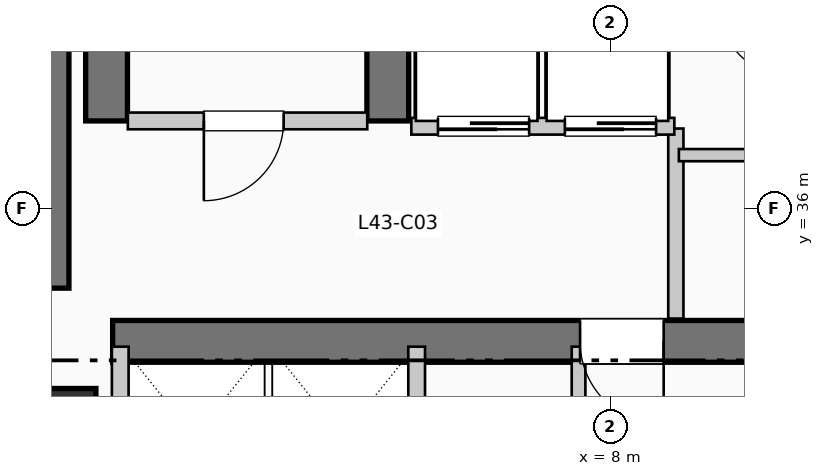
"""IFC4 building model, lengths in metres.
Left out: names, types, materials, properties, quantities, classifications, styles, units other than length and angle.
Written with IfcOpenShell. Run it as: python <this file> out.ifc"""

import sys

from ifc_helpers import new_model, si_unit, direction, frame, frame_2d, origin, origin_2d, place, context, subcontext, project, spatial, rectangle, extrude, element, fill, save


model = new_model("IFC4")
c1 = context("Model", 3, precision=1e-05, world=origin(), true_north=direction((0.0, 1.0)))
c2 = subcontext(c1, "Body", "Model", "MODEL_VIEW")
j1 = project(units=[si_unit("LENGTHUNIT", "METRE"), si_unit("PLANEANGLEUNIT", "RADIAN")], contexts=[c1])
p1 = place(None, origin())
s1 = spatial("IfcSite", under=j1, at=p1, CompositionType="ELEMENT")
p2 = place(p1, origin())
s2 = spatial("IfcBuilding", under=s1, at=p2, CompositionType="ELEMENT")
p3 = place(p2, frame((0.0, 0.0, 179.52)))
s3 = spatial("IfcBuildingStorey", under=s2, at=p3, CompositionType="ELEMENT", Elevation=179.52)
p4 = place(p3, frame((0.5, 34.95, 0.0), z_axis=(0.0, 0.0, 1.0), x_axis=(0.0, 1.0, 0.0)))
e1 = element("IfcWall", 1, at=p4, inside=s3, PredefinedType="SHEAR", context=c2, shape_type="SweptSolid", body=[
    extrude(rectangle(XDim=7.9, YDim=0.75, at=frame_2d((3.95, 0.0))), origin(), (0.0, 0.0, 1.0), 3.96),
])
p5 = place(p3, frame((1.45, 34.25, 0.0), z_axis=(0.0, 0.0, 1.0), x_axis=(1.0, 0.0, 0.0)))
e2 = element("IfcWall", 2, at=p5, inside=s3, PredefinedType="SHEAR", context=c2, shape_type="SweptSolid", body=[
    extrude(rectangle(XDim=10.71, YDim=0.55, at=frame_2d((5.355, 0.0))), origin(), (0.0, 0.0, 1.0), 3.96),
])
p6 = place(p5, frame((7.25, 0.0, 0.0), z_axis=(0.0, 0.0, 1.0), x_axis=(-1.0, 0.0, 0.0)))
e3 = element("IfcOpeningElement", 3, at=p6, cuts=e2, PredefinedType="OPENING", context=c2, shape_type="SweptSolid", body=[
    extrude(rectangle(XDim=1.1, YDim=2.15, at=frame_2d((0.55, 1.075))), frame((0.0, 0.285, 0.0), z_axis=(0.0, -1.0, 0.0), x_axis=(1.0, 0.0, 0.0)), (0.0, 0.0, 1.0), 0.57),
])
for number, where, z_axis, x_axis in (
    (4, (1.37, 37.15, 0.0), (0.0, 0.0, 1.0), (0.0, 1.0, 0.0)),
    (5, (5.07, 37.15, 0.0), (0.0, 0.0, 1.0), (0.0, 1.0, 0.0)),
):
    element("IfcWall", number, at=place(p3, frame(where, z_axis=z_axis, x_axis=x_axis)), inside=s3, PredefinedType="SHEAR", context=c2, shape_type="SweptSolid", body=[
        extrude(rectangle(XDim=7.89, YDim=0.55, at=frame_2d((3.945, 0.0))), origin(), (0.0, 0.0, 1.0), 3.96),
    ])
p7 = place(p3, frame((0.8, 33.2, 0.0), z_axis=(0.0, 0.0, 1.0), x_axis=(1.0, 0.0, 0.0)))
e6 = element("IfcColumn", 6, at=p7, inside=s3, PredefinedType="COLUMN", context=c2, shape_type="SweptSolid", body=[
    extrude(rectangle(XDim=0.86, YDim=0.86, at=origin_2d()), origin(), (0.0, 0.0, 1.0), 3.96),
])
p8 = place(p3, frame((1.65, 37.15, 0.0), z_axis=(0.0, 0.0, 1.0), x_axis=(1.0, 0.0, 0.0)))
e7 = element("IfcWall", 7, at=p8, inside=s3, PredefinedType="PARTITIONING", context=c2, shape_type="SweptSolid", body=[
    extrude(rectangle(XDim=3.15, YDim=0.22, at=frame_2d((1.575, 0.0))), origin(), (0.0, 0.0, 1.0), 3.71),
])
p9 = place(p8, frame((2.05, 0.0, 0.0), z_axis=(0.0, 0.0, 1.0), x_axis=(-1.0, 0.0, 0.0)))
e8 = element("IfcOpeningElement", 8, at=p9, cuts=e7, PredefinedType="OPENING", context=c2, shape_type="SweptSolid", body=[
    extrude(rectangle(XDim=1.05, YDim=2.15, at=frame_2d((0.525, 1.075))), frame((0.0, 0.12, 0.0), z_axis=(0.0, -1.0, 0.0), x_axis=(1.0, 0.0, 0.0)), (0.0, 0.0, 1.0), 0.24),
])
p10 = place(p3, frame((8.86, 34.55, 0.0), z_axis=(0.0, 0.0, 1.0), x_axis=(0.0, 1.0, 0.0)))
e9 = element("IfcWall", 9, at=p10, inside=s3, PredefinedType="PARTITIONING", context=c2, shape_type="SweptSolid", body=[
    extrude(rectangle(XDim=2.5, YDim=0.2, at=frame_2d((1.25, 0.0))), origin(), (0.0, 0.0, 1.0), 3.71),
])
p11 = place(p3, frame((5.38, 37.08, 0.0), z_axis=(0.0, 0.0, 1.0), x_axis=(1.0, 0.0, 0.0)))
e10 = element("IfcWall", 10, at=p11, inside=s3, PredefinedType="PARTITIONING", context=c2, shape_type="SweptSolid", body=[
    extrude(rectangle(XDim=3.46, YDim=0.22, at=frame_2d((1.73, 0.0))), origin(), (0.0, 0.0, 1.0), 3.71),
])
p12 = place(p11, frame((1.55, 0.0, 0.0), z_axis=(0.0, 0.0, 1.0), x_axis=(-1.0, 0.0, 0.0)))
e11 = element("IfcOpeningElement", 11, at=p12, cuts=e10, PredefinedType="OPENING", context=c2, shape_type="SweptSolid", body=[
    extrude(rectangle(XDim=1.2, YDim=2.2, at=frame_2d((0.6, 1.1))), frame((0.0, 0.12, 0.0), z_axis=(0.0, -1.0, 0.0), x_axis=(1.0, 0.0, 0.0)), (0.0, 0.0, 1.0), 0.24),
])
p13 = place(p11, frame((3.22, 0.0, 0.0), z_axis=(0.0, 0.0, 1.0), x_axis=(-1.0, 0.0, 0.0)))
e12 = element("IfcOpeningElement", 12, at=p13, cuts=e10, PredefinedType="OPENING", context=c2, shape_type="SweptSolid", body=[
    extrude(rectangle(XDim=1.2, YDim=2.2, at=frame_2d((0.6, 1.1))), frame((0.0, 0.12, 0.0), z_axis=(0.0, -1.0, 0.0), x_axis=(1.0, 0.0, 0.0)), (0.0, 0.0, 1.0), 0.24),
])
for number, where, z_axis, x_axis in (
    (13, (1.55, 31.8, 0.0), (0.0, 0.0, 1.0), (0.0, 1.0, 0.0)),
    (14, (5.45, 31.8, 0.0), (0.0, 0.0, 1.0), (0.0, 1.0, 0.0)),
):
    element("IfcWall", number, at=place(p3, frame(where, z_axis=z_axis, x_axis=x_axis)), inside=s3, PredefinedType="PARTITIONING", context=c2, shape_type="SweptSolid", body=[
        extrude(rectangle(XDim=2.38, YDim=0.22, at=frame_2d((1.19, 0.0))), origin(), (0.0, 0.0, 1.0), 3.71),
    ])
p14 = place(p3, frame((7.58, 31.82, 0.0), z_axis=(0.0, 0.0, 1.0), x_axis=(0.0, 1.0, 0.0)))
e15 = element("IfcWall", 15, at=p14, inside=s3, PredefinedType="PLUMBINGWALL", context=c2, shape_type="SweptSolid", body=[
    extrude(rectangle(XDim=2.36, YDim=0.18, at=frame_2d((1.18, 0.0))), origin(), (0.0, 0.0, 1.0), 3.71),
])
p15 = place(p3, frame((8.9, 36.7, 0.0), z_axis=(0.0, 0.0, 1.0), x_axis=(1.0, 0.0, 0.0)))
e16 = element("IfcWall", 16, at=p15, inside=s3, PredefinedType="PARTITIONING", context=c2, shape_type="SweptSolid", body=[
    extrude(rectangle(XDim=3.25, YDim=0.16, at=frame_2d((1.625, 0.0))), origin(), (0.0, 0.0, 1.0), 3.71),
])
p16 = place(p15, frame((1.1, 0.0, 0.0)))
e17 = element("IfcOpeningElement", 17, at=p16, cuts=e16, PredefinedType="OPENING", context=c2, shape_type="SweptSolid", body=[
    extrude(rectangle(XDim=0.95, YDim=2.15, at=frame_2d((0.475, 1.075))), frame((0.0, 0.09, 0.0), z_axis=(0.0, -1.0, 0.0), x_axis=(1.0, 0.0, 0.0)), (0.0, 0.0, 1.0), 0.18),
])
p17 = place(p9, origin())
e18 = element("IfcDoor", 18, at=p17, inside=s3, OperationType="SINGLE_SWING_LEFT", PredefinedType="DOOR", context=c2, shape_type="SweptSolid", body=[
    extrude(rectangle(XDim=1.05, YDim=2.15, at=frame_2d((0.525, 1.075))), frame((0.0, 0.025, 0.0), z_axis=(0.0, -1.0, 0.0), x_axis=(1.0, 0.0, 0.0)), (0.0, 0.0, 1.0), 0.05),
])
fill(e8, e18)
p18 = place(p6, origin())
e19 = element("IfcDoor", 19, at=p18, inside=s3, OperationType="SINGLE_SWING_RIGHT", PredefinedType="DOOR", context=c2, shape_type="SweptSolid", body=[
    extrude(rectangle(XDim=1.1, YDim=2.15, at=frame_2d((0.55, 1.075))), frame((0.0, 0.025, 0.0), z_axis=(0.0, -1.0, 0.0), x_axis=(1.0, 0.0, 0.0)), (0.0, 0.0, 1.0), 0.05),
])
fill(e3, e19)
p19 = place(p12, origin())
e20 = element("IfcDoor", 20, at=p19, inside=s3, OperationType="SLIDING_TO_RIGHT", PredefinedType="DOOR", context=c2, shape_type="SweptSolid", body=[
    extrude(rectangle(XDim=1.2, YDim=2.2, at=frame_2d((0.6, 1.1))), frame((0.0, 0.025, 0.0), z_axis=(0.0, -1.0, 0.0), x_axis=(1.0, 0.0, 0.0)), (0.0, 0.0, 1.0), 0.05),
])
fill(e11, e20)
p20 = place(p13, origin())
e21 = element("IfcDoor", 21, at=p20, inside=s3, OperationType="SLIDING_TO_RIGHT", PredefinedType="DOOR", context=c2, shape_type="SweptSolid", body=[
    extrude(rectangle(XDim=1.2, YDim=2.2, at=frame_2d((0.6, 1.1))), frame((0.0, 0.025, 0.0), z_axis=(0.0, -1.0, 0.0), x_axis=(1.0, 0.0, 0.0)), (0.0, 0.0, 1.0), 0.05),
])
fill(e12, e21)
save(model, sys.argv[1])
